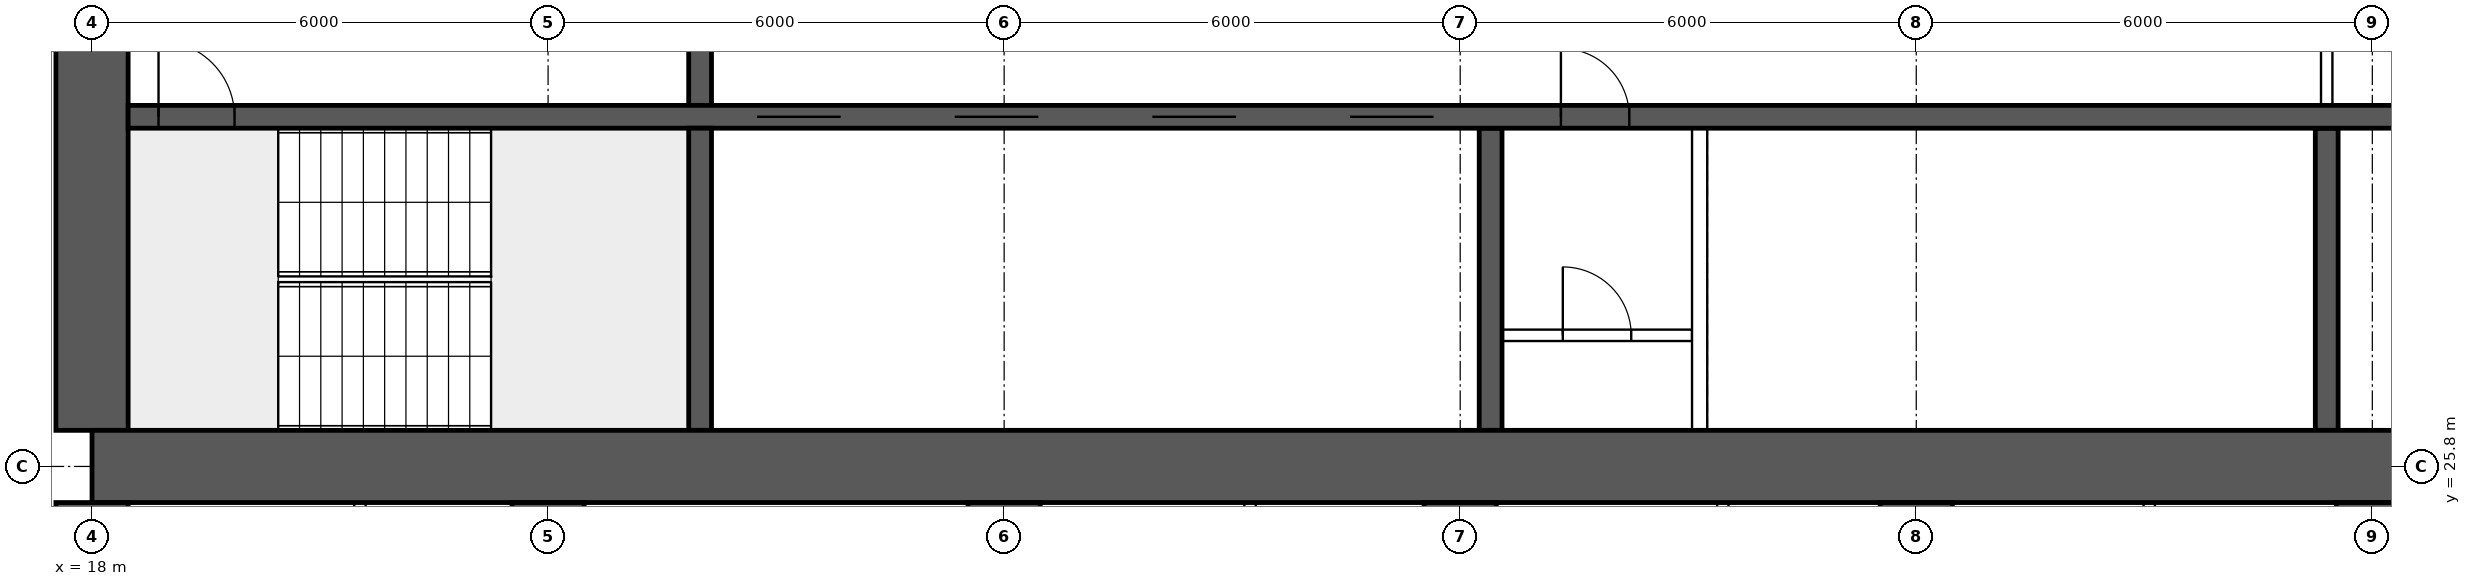
"""IFC4 building model, lengths in metres.
Left out: names, types, materials, properties, quantities, classifications, styles, units other than length and angle.
Written with IfcOpenShell. Run it as: python <this file> out.ifc"""

import sys

from ifc_helpers import new_model, si_unit, direction, frame, frame_2d, origin, place, context, subcontext, project, spatial, rectangle, extrude, element, fill, save


model = new_model("IFC4")
c1 = context("Model", 3, precision=1e-05, world=origin(), true_north=direction((0.0, 1.0)))
c2 = subcontext(c1, "Body", "Model", "MODEL_VIEW")
j1 = project(units=[si_unit("LENGTHUNIT", "METRE"), si_unit("PLANEANGLEUNIT", "RADIAN")], contexts=[c1])
p1 = place(None, origin())
s1 = spatial("IfcSite", under=j1, at=p1, CompositionType="ELEMENT")
p2 = place(p1, origin())
s2 = spatial("IfcBuilding", under=s1, at=p2, CompositionType="ELEMENT")
p3 = place(p2, frame((0.0, 0.0, 99.4)))
s3 = spatial("IfcBuildingStorey", under=s2, at=p3, CompositionType="ELEMENT", Elevation=99.4)
p4 = place(p3, frame((18.0, 25.8, 0.0), z_axis=(0.0, 0.0, 1.0), x_axis=(1.0, 0.0, 0.0)))
e1 = element("IfcWall", 1, at=p4, inside=s3, PredefinedType="SHEAR", context=c2, shape_type="SweptSolid", body=[
    extrude(rectangle(XDim=48.0, YDim=0.95, at=frame_2d((24.0, 0.0))), origin(), (0.0, 0.0, 1.0), 3.75),
])
p5 = place(p3, frame((18.0, 26.275, 0.0), z_axis=(0.0, 0.0, 1.0), x_axis=(0.0, 1.0, 0.0)))
e2 = element("IfcWall", 2, at=p5, inside=s3, PredefinedType="SHEAR", context=c2, shape_type="SweptSolid", body=[
    extrude(rectangle(XDim=11.45, YDim=0.95, at=frame_2d((5.725, 0.0))), origin(), (0.0, 0.0, 1.0), 3.75),
])
p6 = place(p5, frame((5.025, 0.0, 0.0)))
e3 = element("IfcOpeningElement", 3, at=p6, cuts=e2, PredefinedType="OPENING", context=c2, shape_type="SweptSolid", body=[
    extrude(rectangle(XDim=1.2, YDim=2.1, at=frame_2d((0.6, 1.05))), frame((0.0, 0.485, 0.0), z_axis=(0.0, -1.0, 0.0), x_axis=(1.0, 0.0, 0.0)), (0.0, 0.0, 1.0), 0.97),
])
p7 = place(p3, frame((18.475, 30.4, 0.0), z_axis=(0.0, 0.0, 1.0), x_axis=(1.0, 0.0, 0.0)))
e4 = element("IfcWall", 4, at=p7, inside=s3, PredefinedType="SHEAR", context=c2, shape_type="SweptSolid", body=[
    extrude(rectangle(XDim=47.05, YDim=0.3, at=frame_2d((23.525, 0.0))), origin(), (0.0, 0.0, 1.0), 3.75),
])
p8 = place(p7, frame((0.4, 0.0, 0.0)))
e5 = element("IfcOpeningElement", 5, at=p8, cuts=e4, PredefinedType="OPENING", context=c2, shape_type="SweptSolid", body=[
    extrude(rectangle(XDim=1.0, YDim=2.1, at=frame_2d((0.5, 1.05))), frame((0.0, 0.16, 0.0), z_axis=(0.0, -1.0, 0.0), x_axis=(1.0, 0.0, 0.0)), (0.0, 0.0, 1.0), 0.32),
])
p9 = place(p7, frame((45.65, 0.0, 0.0)))
e6 = element("IfcOpeningElement", 6, at=p9, cuts=e4, PredefinedType="OPENING", context=c2, shape_type="SweptSolid", body=[
    extrude(rectangle(XDim=1.0, YDim=2.1, at=frame_2d((0.5, 1.05))), frame((0.0, 0.16, 0.0), z_axis=(0.0, -1.0, 0.0), x_axis=(1.0, 0.0, 0.0)), (0.0, 0.0, 1.0), 0.32),
])
p10 = place(p7, frame((8.275, 0.0, 0.0)))
e7 = element("IfcOpeningElement", 7, at=p10, cuts=e4, PredefinedType="OPENING", context=c2, shape_type="SweptSolid", body=[
    extrude(rectangle(XDim=1.1, YDim=2.1, at=frame_2d((0.55, 1.05))), frame((0.0, 0.16, 0.0), z_axis=(0.0, -1.0, 0.0), x_axis=(1.0, 0.0, 0.0)), (0.0, 0.0, 1.0), 0.32),
])
p11 = place(p7, frame((10.875, 0.0, 0.0)))
e8 = element("IfcOpeningElement", 8, at=p11, cuts=e4, PredefinedType="OPENING", context=c2, shape_type="SweptSolid", body=[
    extrude(rectangle(XDim=1.1, YDim=2.1, at=frame_2d((0.55, 1.05))), frame((0.0, 0.16, 0.0), z_axis=(0.0, -1.0, 0.0), x_axis=(1.0, 0.0, 0.0)), (0.0, 0.0, 1.0), 0.32),
])
p12 = place(p7, frame((13.475, 0.0, 0.0)))
e9 = element("IfcOpeningElement", 9, at=p12, cuts=e4, PredefinedType="OPENING", context=c2, shape_type="SweptSolid", body=[
    extrude(rectangle(XDim=1.1, YDim=2.1, at=frame_2d((0.55, 1.05))), frame((0.0, 0.16, 0.0), z_axis=(0.0, -1.0, 0.0), x_axis=(1.0, 0.0, 0.0)), (0.0, 0.0, 1.0), 0.32),
])
p13 = place(p7, frame((16.075, 0.0, 0.0)))
e10 = element("IfcOpeningElement", 10, at=p13, cuts=e4, PredefinedType="OPENING", context=c2, shape_type="SweptSolid", body=[
    extrude(rectangle(XDim=1.1, YDim=2.1, at=frame_2d((0.55, 1.05))), frame((0.0, 0.16, 0.0), z_axis=(0.0, -1.0, 0.0), x_axis=(1.0, 0.0, 0.0)), (0.0, 0.0, 1.0), 0.32),
])
p14 = place(p7, frame((18.85, 0.0, 0.0)))
e11 = element("IfcOpeningElement", 11, at=p14, cuts=e4, PredefinedType="OPENING", context=c2, shape_type="SweptSolid", body=[
    extrude(rectangle(XDim=0.9, YDim=2.1, at=frame_2d((0.45, 1.05))), frame((0.0, 0.16, 0.0), z_axis=(0.0, -1.0, 0.0), x_axis=(1.0, 0.0, 0.0)), (0.0, 0.0, 1.0), 0.32),
])
p15 = place(p7, frame((30.142, 0.0, 0.0)))
e12 = element("IfcOpeningElement", 12, at=p15, cuts=e4, PredefinedType="OPENING", context=c2, shape_type="SweptSolid", body=[
    extrude(rectangle(XDim=1.1, YDim=2.1, at=frame_2d((0.55, 1.05))), frame((0.0, 0.16, 0.0), z_axis=(0.0, -1.0, 0.0), x_axis=(1.0, 0.0, 0.0)), (0.0, 0.0, 1.0), 0.32),
])
p16 = place(p7, frame((33.675, 0.0, 0.0)))
e13 = element("IfcOpeningElement", 13, at=p16, cuts=e4, PredefinedType="OPENING", context=c2, shape_type="SweptSolid", body=[
    extrude(rectangle(XDim=1.1, YDim=2.1, at=frame_2d((0.55, 1.05))), frame((0.0, 0.16, 0.0), z_axis=(0.0, -1.0, 0.0), x_axis=(1.0, 0.0, 0.0)), (0.0, 0.0, 1.0), 0.32),
])
p17 = place(p7, frame((37.208, 0.0, 0.0)))
e14 = element("IfcOpeningElement", 14, at=p17, cuts=e4, PredefinedType="OPENING", context=c2, shape_type="SweptSolid", body=[
    extrude(rectangle(XDim=1.1, YDim=2.1, at=frame_2d((0.55, 1.05))), frame((0.0, 0.16, 0.0), z_axis=(0.0, -1.0, 0.0), x_axis=(1.0, 0.0, 0.0)), (0.0, 0.0, 1.0), 0.32),
])
p18 = place(p3, frame((26.0, 26.275, 0.0), z_axis=(0.0, 0.0, 1.0), x_axis=(0.0, 1.0, 0.0)))
e15 = element("IfcWall", 15, at=p18, inside=s3, PredefinedType="SHEAR", context=c2, shape_type="SweptSolid", body=[
    extrude(rectangle(XDim=3.975, YDim=0.3, at=frame_2d((1.988, 0.0))), origin(), (0.0, 0.0, 1.0), 3.75),
])
p19 = place(p3, frame((26.0, 30.55, 0.0), z_axis=(0.0, 0.0, 1.0), x_axis=(0.0, 1.0, 0.0)))
e16 = element("IfcWall", 16, at=p19, inside=s3, PredefinedType="SHEAR", context=c2, shape_type="SweptSolid", body=[
    extrude(rectangle(XDim=3.9, YDim=0.3, at=frame_2d((1.95, 0.0))), origin(), (0.0, 0.0, 1.0), 3.75),
])
p20 = place(p19, frame((1.4, 0.0, 0.0)))
e17 = element("IfcOpeningElement", 17, at=p20, cuts=e16, PredefinedType="OPENING", context=c2, shape_type="SweptSolid", body=[
    extrude(rectangle(XDim=1.2, YDim=2.1, at=frame_2d((0.6, 1.05))), frame((0.0, 0.16, 0.0), z_axis=(0.0, -1.0, 0.0), x_axis=(1.0, 0.0, 0.0)), (0.0, 0.0, 1.0), 0.32),
])
for number, where, z_axis, x_axis in (
    (18, (36.4, 26.275, 0.0), (0.0, 0.0, 1.0), (0.0, 1.0, 0.0)),
    (19, (47.4, 26.275, 0.0), (0.0, 0.0, 1.0), (0.0, 1.0, 0.0)),
):
    element("IfcWall", number, at=place(p3, frame(where, z_axis=z_axis, x_axis=x_axis)), inside=s3, PredefinedType="SHEAR", context=c2, shape_type="SweptSolid", body=[
        extrude(rectangle(XDim=3.975, YDim=0.3, at=frame_2d((1.988, 0.0))), origin(), (0.0, 0.0, 1.0), 3.75),
    ])
for number, where, z_axis, x_axis in (
    (20, (18.0, 16.0, 0.0), (0.0, 0.0, 1.0), (0.0, 1.0, 0.0)),
    (21, (24.0, 16.0, 0.0), (0.0, 0.0, 1.0), (0.0, 1.0, 0.0)),
    (22, (30.0, 16.0, 0.0), (0.0, 0.0, 1.0), (0.0, 1.0, 0.0)),
    (23, (36.0, 16.0, 0.0), (0.0, 0.0, 1.0), (0.0, 1.0, 0.0)),
    (24, (42.0, 16.0, 0.0), (0.0, 0.0, 1.0), (0.0, 1.0, 0.0)),
    (25, (48.0, 16.0, 0.0), (0.0, 0.0, 1.0), (0.0, 1.0, 0.0)),
):
    element("IfcWall", number, at=place(p3, frame(where, z_axis=z_axis, x_axis=x_axis)), inside=s3, PredefinedType="SHEAR", context=c2, shape_type="SweptSolid", body=[
        extrude(rectangle(XDim=9.325, YDim=0.95, at=frame_2d((4.663, 0.0))), origin(), (0.0, 0.0, 1.0), 3.75),
    ])
p21 = place(p3, frame((47.4, 30.55, 0.0), z_axis=(0.0, 0.0, 1.0), x_axis=(0.0, 1.0, 0.0)))
e26 = element("IfcWall", 26, at=p21, inside=s3, PredefinedType="SOLIDWALL", context=c2, shape_type="SweptSolid", body=[
    extrude(rectangle(XDim=3.9, YDim=0.15, at=frame_2d((1.95, 0.0))), origin(), (0.0, 0.0, 1.0), 3.5),
])
p22 = place(p21, frame((1.15, 0.0, 0.0)))
e27 = element("IfcOpeningElement", 27, at=p22, cuts=e26, PredefinedType="OPENING", context=c2, shape_type="SweptSolid", body=[
    extrude(rectangle(XDim=1.6, YDim=2.1, at=frame_2d((0.8, 1.05))), frame((0.0, 0.085, 0.0), z_axis=(0.0, -1.0, 0.0), x_axis=(1.0, 0.0, 0.0)), (0.0, 0.0, 1.0), 0.17),
])
p23 = place(p3, frame((36.55, 27.525, 0.0), z_axis=(0.0, 0.0, 1.0), x_axis=(1.0, 0.0, 0.0)))
e28 = element("IfcWall", 28, at=p23, inside=s3, PredefinedType="SOLIDWALL", context=c2, shape_type="SweptSolid", body=[
    extrude(rectangle(XDim=2.5, YDim=0.15, at=frame_2d((1.25, 0.0))), origin(), (0.0, 0.0, 1.0), 3.5),
])
p24 = place(p23, frame((0.8, 0.0, 0.0)))
e29 = element("IfcOpeningElement", 29, at=p24, cuts=e28, PredefinedType="OPENING", context=c2, shape_type="SweptSolid", body=[
    extrude(rectangle(XDim=0.9, YDim=2.1, at=frame_2d((0.45, 1.05))), frame((0.0, 0.085, 0.0), z_axis=(0.0, -1.0, 0.0), x_axis=(1.0, 0.0, 0.0)), (0.0, 0.0, 1.0), 0.17),
])
p25 = place(p3, frame((39.15, 26.275, 0.0), z_axis=(0.0, 0.0, 1.0), x_axis=(0.0, 1.0, 0.0)))
e30 = element("IfcWall", 30, at=p25, inside=s3, PredefinedType="SOLIDWALL", context=c2, shape_type="SweptSolid", body=[
    extrude(rectangle(XDim=3.975, YDim=0.2, at=frame_2d((1.988, 0.0))), origin(), (0.0, 0.0, 1.0), 3.5),
])
for number, where, z_axis, x_axis in (
    (31, (21.525, 16.1, 0.0), (0.0, 0.0, 1.0), (0.0, 1.0, 0.0)),
    (32, (33.235, 16.1, 0.0), (0.0, 0.0, 1.0), (0.0, 1.0, 0.0)),
    (33, (39.455, 16.1, 0.0), (0.0, 0.0, 1.0), (0.0, 1.0, 0.0)),
    (34, (45.065, 16.1, 0.0), (0.0, 0.0, 1.0), (0.0, 1.0, 0.0)),
):
    element("IfcWall", number, at=place(p3, frame(where, z_axis=z_axis, x_axis=x_axis)), inside=s3, PredefinedType="PARTITIONING", context=c2, shape_type="SweptSolid", body=[
        extrude(rectangle(XDim=9.225, YDim=0.15, at=frame_2d((4.612, 0.0))), origin(), (0.0, 0.0, 1.0), 3.5),
    ])
p26 = place(p8, origin())
e35 = element("IfcDoor", 35, at=p26, inside=s3, OperationType="SINGLE_SWING_LEFT", PredefinedType="DOOR", context=c2, shape_type="SweptSolid", body=[
    extrude(rectangle(XDim=1.0, YDim=2.1, at=frame_2d((0.5, 1.05))), frame((0.0, 0.025, 0.0), z_axis=(0.0, -1.0, 0.0), x_axis=(1.0, 0.0, 0.0)), (0.0, 0.0, 1.0), 0.05),
])
fill(e5, e35)
p27 = place(p10, origin())
e36 = element("IfcDoor", 36, at=p27, inside=s3, OperationType="DOUBLE_DOOR_SLIDING", PredefinedType="DOOR", context=c2, shape_type="SweptSolid", body=[
    extrude(rectangle(XDim=1.1, YDim=2.1, at=frame_2d((0.55, 1.05))), frame((0.0, 0.025, 0.0), z_axis=(0.0, -1.0, 0.0), x_axis=(1.0, 0.0, 0.0)), (0.0, 0.0, 1.0), 0.05),
])
fill(e7, e36)
p28 = place(p11, origin())
e37 = element("IfcDoor", 37, at=p28, inside=s3, OperationType="DOUBLE_DOOR_SLIDING", PredefinedType="DOOR", context=c2, shape_type="SweptSolid", body=[
    extrude(rectangle(XDim=1.1, YDim=2.1, at=frame_2d((0.55, 1.05))), frame((0.0, 0.025, 0.0), z_axis=(0.0, -1.0, 0.0), x_axis=(1.0, 0.0, 0.0)), (0.0, 0.0, 1.0), 0.05),
])
fill(e8, e37)
p29 = place(p12, origin())
e38 = element("IfcDoor", 38, at=p29, inside=s3, OperationType="DOUBLE_DOOR_SLIDING", PredefinedType="DOOR", context=c2, shape_type="SweptSolid", body=[
    extrude(rectangle(XDim=1.1, YDim=2.1, at=frame_2d((0.55, 1.05))), frame((0.0, 0.025, 0.0), z_axis=(0.0, -1.0, 0.0), x_axis=(1.0, 0.0, 0.0)), (0.0, 0.0, 1.0), 0.05),
])
fill(e9, e38)
p30 = place(p13, origin())
e39 = element("IfcDoor", 39, at=p30, inside=s3, OperationType="DOUBLE_DOOR_SLIDING", PredefinedType="DOOR", context=c2, shape_type="SweptSolid", body=[
    extrude(rectangle(XDim=1.1, YDim=2.1, at=frame_2d((0.55, 1.05))), frame((0.0, 0.025, 0.0), z_axis=(0.0, -1.0, 0.0), x_axis=(1.0, 0.0, 0.0)), (0.0, 0.0, 1.0), 0.05),
])
fill(e10, e39)
p31 = place(p24, origin())
e40 = element("IfcDoor", 40, at=p31, inside=s3, OperationType="SINGLE_SWING_LEFT", PredefinedType="DOOR", context=c2, shape_type="SweptSolid", body=[
    extrude(rectangle(XDim=0.9, YDim=2.1, at=frame_2d((0.45, 1.05))), frame((0.0, 0.025, 0.0), z_axis=(0.0, -1.0, 0.0), x_axis=(1.0, 0.0, 0.0)), (0.0, 0.0, 1.0), 0.05),
])
fill(e29, e40)
p32 = place(p14, origin())
e41 = element("IfcDoor", 41, at=p32, inside=s3, OperationType="SINGLE_SWING_LEFT", PredefinedType="DOOR", context=c2, shape_type="SweptSolid", body=[
    extrude(rectangle(XDim=0.9, YDim=2.1, at=frame_2d((0.45, 1.05))), frame((0.0, 0.025, 0.0), z_axis=(0.0, -1.0, 0.0), x_axis=(1.0, 0.0, 0.0)), (0.0, 0.0, 1.0), 0.05),
])
fill(e11, e41)
save(model, sys.argv[1])
